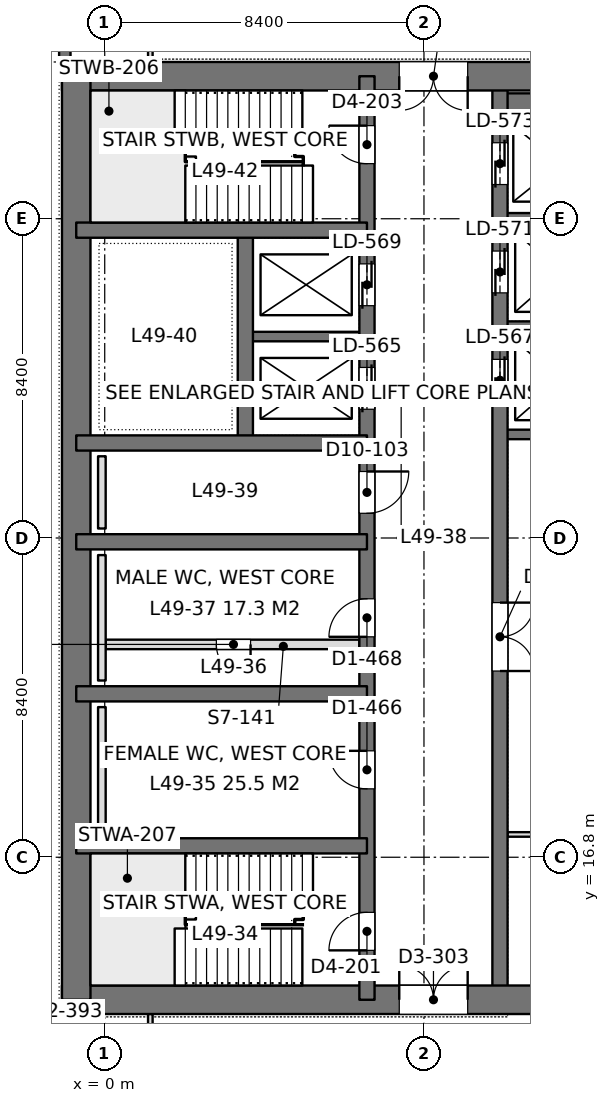
"""IFC4 building model, lengths in metres.
Left out: names, types, materials, properties, quantities, classifications, styles, units other than length and angle.
Written with IfcOpenShell. Run it as: python <this file> out.ifc"""

import sys

from ifc_helpers import new_model, si_unit, direction, frame, frame_2d, origin, place, context, subcontext, project, spatial, rectangle, extrude, element, fill, save


model = new_model("IFC4")
c1 = context("Model", 3, precision=1e-05, world=origin(), true_north=direction((0.0, 1.0)))
c2 = subcontext(c1, "Body", "Model", "MODEL_VIEW")
j1 = project(units=[si_unit("LENGTHUNIT", "METRE"), si_unit("PLANEANGLEUNIT", "RADIAN")], contexts=[c1])
p1 = place(None, origin())
s1 = spatial("IfcSite", under=j1, at=p1, CompositionType="ELEMENT")
p2 = place(p1, origin())
s2 = spatial("IfcBuilding", under=s1, at=p2, CompositionType="ELEMENT")
p3 = place(p2, frame((0.0, 0.0, 215.4)))
s3 = spatial("IfcBuildingStorey", under=s2, at=p3, CompositionType="ELEMENT", Elevation=215.4)
p4 = place(p3, frame((-1.125, 13.05, 0.0), z_axis=(0.0, 0.0, 1.0), x_axis=(1.0, 0.0, 0.0)))
e1 = element("IfcWall", 1, at=p4, inside=s3, PredefinedType="SHEAR", context=c2, shape_type="SweptSolid", body=[
    extrude(rectangle(XDim=17.85, YDim=0.75, at=frame_2d((8.925, 0.0))), origin(), (0.0, 0.0, 1.0), 4.2),
])
p5 = place(p4, frame((8.875, 0.0, 0.0)))
e2 = element("IfcOpeningElement", 2, at=p5, cuts=e1, PredefinedType="OPENING", context=c2, shape_type="SweptSolid", body=[
    extrude(rectangle(XDim=1.8, YDim=2.4, at=frame_2d((0.9, 1.2))), frame((0.0, 0.385, 0.0), z_axis=(0.0, -1.0, 0.0), x_axis=(1.0, 0.0, 0.0)), (0.0, 0.0, 1.0), 0.77),
])
p6 = place(p3, frame((-1.125, 37.35, 0.0), z_axis=(0.0, 0.0, 1.0), x_axis=(1.0, 0.0, 0.0)))
e3 = element("IfcWall", 3, at=p6, inside=s3, PredefinedType="SHEAR", context=c2, shape_type="SweptSolid", body=[
    extrude(rectangle(XDim=17.85, YDim=0.75, at=frame_2d((8.925, 0.0))), origin(), (0.0, 0.0, 1.0), 4.2),
])
p7 = place(p6, frame((8.875, 0.0, 0.0)))
e4 = element("IfcOpeningElement", 4, at=p7, cuts=e3, PredefinedType="OPENING", context=c2, shape_type="SweptSolid", body=[
    extrude(rectangle(XDim=1.8, YDim=2.4, at=frame_2d((0.9, 1.2))), frame((0.0, 0.385, 0.0), z_axis=(0.0, -1.0, 0.0), x_axis=(1.0, 0.0, 0.0)), (0.0, 0.0, 1.0), 0.77),
])
p8 = place(p3, frame((-0.75, 13.05, 0.0), z_axis=(0.0, 0.0, 1.0), x_axis=(0.0, 1.0, 0.0)))
e5 = element("IfcWall", 5, at=p8, inside=s3, PredefinedType="SHEAR", context=c2, shape_type="SweptSolid", body=[
    extrude(rectangle(XDim=24.3, YDim=0.75, at=frame_2d((12.15, 0.0))), origin(), (0.0, 0.0, 1.0), 4.2),
])
p9 = place(p3, frame((6.9, 13.05, 0.0), z_axis=(0.0, 0.0, 1.0), x_axis=(0.0, 1.0, 0.0)))
e6 = element("IfcWall", 6, at=p9, inside=s3, PredefinedType="SHEAR", context=c2, shape_type="SweptSolid", body=[
    extrude(rectangle(XDim=24.3, YDim=0.4, at=frame_2d((12.15, 0.0))), origin(), (0.0, 0.0, 1.0), 4.2),
])
p10 = place(p9, frame((1.3, 0.0, 0.0)))
e7 = element("IfcOpeningElement", 7, at=p10, cuts=e6, PredefinedType="OPENING", context=c2, shape_type="SweptSolid", body=[
    extrude(rectangle(XDim=1.0, YDim=2.2, at=frame_2d((0.5, 1.1))), frame((0.0, 0.21, 0.0), z_axis=(0.0, -1.0, 0.0), x_axis=(1.0, 0.0, 0.0)), (0.0, 0.0, 1.0), 0.42),
])
p11 = place(p9, frame((22.0, 0.0, 0.0)))
e8 = element("IfcOpeningElement", 8, at=p11, cuts=e6, PredefinedType="OPENING", context=c2, shape_type="SweptSolid", body=[
    extrude(rectangle(XDim=1.0, YDim=2.2, at=frame_2d((0.5, 1.1))), frame((0.0, 0.21, 0.0), z_axis=(0.0, -1.0, 0.0), x_axis=(1.0, 0.0, 0.0)), (0.0, 0.0, 1.0), 0.42),
])
p12 = place(p9, frame((5.55, 0.0, 0.0)))
e9 = element("IfcOpeningElement", 9, at=p12, cuts=e6, PredefinedType="OPENING", context=c2, shape_type="SweptSolid", body=[
    extrude(rectangle(XDim=1.0, YDim=2.2, at=frame_2d((0.5, 1.1))), frame((0.0, 0.21, 0.0), z_axis=(0.0, -1.0, 0.0), x_axis=(1.0, 0.0, 0.0)), (0.0, 0.0, 1.0), 0.42),
])
p13 = place(p9, frame((9.55, 0.0, 0.0)))
e10 = element("IfcOpeningElement", 10, at=p13, cuts=e6, PredefinedType="OPENING", context=c2, shape_type="SweptSolid", body=[
    extrude(rectangle(XDim=1.0, YDim=2.2, at=frame_2d((0.5, 1.1))), frame((0.0, 0.21, 0.0), z_axis=(0.0, -1.0, 0.0), x_axis=(1.0, 0.0, 0.0)), (0.0, 0.0, 1.0), 0.42),
])
p14 = place(p9, frame((12.8, 0.0, 0.0)))
e11 = element("IfcOpeningElement", 11, at=p14, cuts=e6, PredefinedType="OPENING", context=c2, shape_type="SweptSolid", body=[
    extrude(rectangle(XDim=1.1, YDim=2.2, at=frame_2d((0.55, 1.1))), frame((0.0, 0.21, 0.0), z_axis=(0.0, -1.0, 0.0), x_axis=(1.0, 0.0, 0.0)), (0.0, 0.0, 1.0), 0.42),
])
p15 = place(p9, frame((15.538, 0.0, 0.0)))
e12 = element("IfcOpeningElement", 12, at=p15, cuts=e6, PredefinedType="OPENING", context=c2, shape_type="SweptSolid", body=[
    extrude(rectangle(XDim=1.1, YDim=2.2, at=frame_2d((0.55, 1.1))), frame((0.0, 0.21, 0.0), z_axis=(0.0, -1.0, 0.0), x_axis=(1.0, 0.0, 0.0)), (0.0, 0.0, 1.0), 0.42),
])
p16 = place(p9, frame((18.262, 0.0, 0.0)))
e13 = element("IfcOpeningElement", 13, at=p16, cuts=e6, PredefinedType="OPENING", context=c2, shape_type="SweptSolid", body=[
    extrude(rectangle(XDim=1.1, YDim=2.2, at=frame_2d((0.55, 1.1))), frame((0.0, 0.21, 0.0), z_axis=(0.0, -1.0, 0.0), x_axis=(1.0, 0.0, 0.0)), (0.0, 0.0, 1.0), 0.42),
])
p17 = place(p3, frame((10.4, 13.05, 0.0), z_axis=(0.0, 0.0, 1.0), x_axis=(0.0, 1.0, 0.0)))
e14 = element("IfcWall", 14, at=p17, inside=s3, PredefinedType="SHEAR", context=c2, shape_type="SweptSolid", body=[
    extrude(rectangle(XDim=24.3, YDim=0.4, at=frame_2d((12.15, 0.0))), origin(), (0.0, 0.0, 1.0), 4.2),
])
p18 = place(p17, frame((15.75, 0.0, 0.0)))
e15 = element("IfcOpeningElement", 15, at=p18, cuts=e14, PredefinedType="OPENING", context=c2, shape_type="SweptSolid", body=[
    extrude(rectangle(XDim=1.1, YDim=2.2, at=frame_2d((0.55, 1.1))), frame((0.0, 0.21, 0.0), z_axis=(0.0, -1.0, 0.0), x_axis=(1.0, 0.0, 0.0)), (0.0, 0.0, 1.0), 0.42),
])
p19 = place(p17, frame((18.6, 0.0, 0.0)))
e16 = element("IfcOpeningElement", 16, at=p19, cuts=e14, PredefinedType="OPENING", context=c2, shape_type="SweptSolid", body=[
    extrude(rectangle(XDim=1.1, YDim=2.2, at=frame_2d((0.55, 1.1))), frame((0.0, 0.21, 0.0), z_axis=(0.0, -1.0, 0.0), x_axis=(1.0, 0.0, 0.0)), (0.0, 0.0, 1.0), 0.42),
])
p20 = place(p17, frame((21.45, 0.0, 0.0)))
e17 = element("IfcOpeningElement", 17, at=p20, cuts=e14, PredefinedType="OPENING", context=c2, shape_type="SweptSolid", body=[
    extrude(rectangle(XDim=1.1, YDim=2.2, at=frame_2d((0.55, 1.1))), frame((0.0, 0.21, 0.0), z_axis=(0.0, -1.0, 0.0), x_axis=(1.0, 0.0, 0.0)), (0.0, 0.0, 1.0), 0.42),
])
p21 = place(p17, frame((8.65, 0.0, 0.0)))
e18 = element("IfcOpeningElement", 18, at=p21, cuts=e14, PredefinedType="OPENING", context=c2, shape_type="SweptSolid", body=[
    extrude(rectangle(XDim=1.8, YDim=2.4, at=frame_2d((0.9, 1.2))), frame((0.0, 0.21, 0.0), z_axis=(0.0, -1.0, 0.0), x_axis=(1.0, 0.0, 0.0)), (0.0, 0.0, 1.0), 0.42),
])
for number, where, z_axis, x_axis in (
    (19, (-0.75, 17.1, 0.0), (0.0, 0.0, 1.0), (1.0, 0.0, 0.0)),
    (20, (-0.75, 21.1, 0.0), (0.0, 0.0, 1.0), (1.0, 0.0, 0.0)),
    (21, (-0.75, 25.1, 0.0), (0.0, 0.0, 1.0), (1.0, 0.0, 0.0)),
    (22, (-0.75, 27.7, 0.0), (0.0, 0.0, 1.0), (1.0, 0.0, 0.0)),
    (23, (-0.75, 33.3, 0.0), (0.0, 0.0, 1.0), (1.0, 0.0, 0.0)),
):
    element("IfcWall", number, at=place(p3, frame(where, z_axis=z_axis, x_axis=x_axis)), inside=s3, PredefinedType="SHEAR", context=c2, shape_type="SweptSolid", body=[
        extrude(rectangle(XDim=7.65, YDim=0.4, at=frame_2d((3.825, 0.0))), origin(), (0.0, 0.0, 1.0), 4.2),
    ])
p22 = place(p3, frame((3.7, 27.7, 0.0), z_axis=(0.0, 0.0, 1.0), x_axis=(0.0, 1.0, 0.0)))
e24 = element("IfcWall", 24, at=p22, inside=s3, PredefinedType="SHEAR", context=c2, shape_type="SweptSolid", body=[
    extrude(rectangle(XDim=5.6, YDim=0.4, at=frame_2d((2.8, 0.0))), origin(), (0.0, 0.0, 1.0), 4.2),
])
p23 = place(p3, frame((3.7, 30.5, 0.0), z_axis=(0.0, 0.0, 1.0), x_axis=(1.0, 0.0, 0.0)))
e25 = element("IfcWall", 25, at=p23, inside=s3, PredefinedType="SHEAR", context=c2, shape_type="SweptSolid", body=[
    extrude(rectangle(XDim=3.2, YDim=0.25, at=frame_2d((1.6, 0.0))), origin(), (0.0, 0.0, 1.0), 4.2),
])
p24 = place(p3, frame((10.4, 27.925, 0.0), z_axis=(0.0, 0.0, 1.0), x_axis=(1.0, 0.0, 0.0)))
e26 = element("IfcWall", 26, at=p24, inside=s3, PredefinedType="SHEAR", context=c2, shape_type="SweptSolid", body=[
    extrude(rectangle(XDim=5.95, YDim=0.25, at=frame_2d((2.975, 0.0))), origin(), (0.0, 0.0, 1.0), 4.2),
])
for number, where, z_axis, x_axis in (
    (27, (10.4, 30.775, 0.0), (0.0, 0.0, 1.0), (1.0, 0.0, 0.0)),
    (28, (10.4, 33.625, 0.0), (0.0, 0.0, 1.0), (1.0, 0.0, 0.0)),
):
    element("IfcWall", number, at=place(p3, frame(where, z_axis=z_axis, x_axis=x_axis)), inside=s3, PredefinedType="SHEAR", context=c2, shape_type="SweptSolid", body=[
        extrude(rectangle(XDim=3.2, YDim=0.25, at=frame_2d((1.6, 0.0))), origin(), (0.0, 0.0, 1.0), 4.2),
    ])
p25 = place(p3, frame((10.4, 36.625, 0.0), z_axis=(0.0, 0.0, 1.0), x_axis=(1.0, 0.0, 0.0)))
e29 = element("IfcWall", 29, at=p25, inside=s3, PredefinedType="SHEAR", context=c2, shape_type="SweptSolid", body=[
    extrude(rectangle(XDim=3.2, YDim=0.55, at=frame_2d((1.6, 0.0))), origin(), (0.0, 0.0, 1.0), 4.2),
])
p26 = place(p3, frame((-1.05, 8.4, 0.0), z_axis=(0.0, 0.0, 1.0), x_axis=(0.0, 1.0, 0.0)))
e30 = element("IfcWall", 30, at=p26, inside=s3, PredefinedType="SOLIDWALL", context=c2, shape_type="SweptSolid", body=[
    extrude(rectangle(XDim=4.275, YDim=0.3, at=frame_2d((2.138, 0.0))), origin(), (0.0, 0.0, 1.0), 4.05),
])
p27 = place(p26, frame((0.938, 0.0, 0.9)))
e31 = element("IfcOpeningElement", 31, at=p27, cuts=e30, PredefinedType="OPENING", context=c2, shape_type="SweptSolid", body=[
    extrude(rectangle(XDim=2.4, YDim=1.9, at=frame_2d((1.2, 0.95))), frame((0.0, 0.16, 0.0), z_axis=(0.0, -1.0, 0.0), x_axis=(1.0, 0.0, 0.0)), (0.0, 0.0, 1.0), 0.32),
])
p28 = place(p3, frame((-1.05, 37.725, 0.0), z_axis=(0.0, 0.0, 1.0), x_axis=(0.0, 1.0, 0.0)))
e32 = element("IfcWall", 32, at=p28, inside=s3, PredefinedType="SOLIDWALL", context=c2, shape_type="SweptSolid", body=[
    extrude(rectangle(XDim=4.275, YDim=0.3, at=frame_2d((2.137, 0.0))), origin(), (0.0, 0.0, 1.0), 4.05),
])
p29 = place(p28, frame((0.938, 0.0, 0.9)))
e33 = element("IfcOpeningElement", 33, at=p29, cuts=e32, PredefinedType="OPENING", context=c2, shape_type="SweptSolid", body=[
    extrude(rectangle(XDim=2.4, YDim=1.9, at=frame_2d((1.2, 0.95))), frame((0.0, 0.16, 0.0), z_axis=(0.0, -1.0, 0.0), x_axis=(1.0, 0.0, 0.0)), (0.0, 0.0, 1.0), 0.32),
])
p30 = place(p3, frame((10.598, 17.4, 0.0), z_axis=(0.0, 0.0, 1.0), x_axis=(1.0, 0.0, 0.0)))
e34 = element("IfcWall", 34, at=p30, inside=s3, PredefinedType="PARTITIONING", context=c2, shape_type="SweptSolid", body=[
    extrude(rectangle(XDim=5.904, YDim=0.12, at=frame_2d((2.952, 0.0))), origin(), (0.0, 0.0, 1.0), 3.55),
])
p31 = place(p3, frame((1.2, 10.7, 0.0), z_axis=(0.0, 0.0, 1.0), x_axis=(0.0, 1.0, 0.0)))
e35 = element("IfcWall", 35, at=p31, inside=s3, PredefinedType="PARTITIONING", context=c2, shape_type="SweptSolid", body=[
    extrude(rectangle(XDim=1.976, YDim=0.12, at=frame_2d((0.988, 0.0))), origin(), (0.0, 0.0, 1.0), 4.05),
])
p32 = place(p3, frame((1.2, 37.724, 0.0), z_axis=(0.0, 0.0, 1.0), x_axis=(0.0, 1.0, 0.0)))
e36 = element("IfcWall", 36, at=p32, inside=s3, PredefinedType="PARTITIONING", context=c2, shape_type="SweptSolid", body=[
    extrude(rectangle(XDim=1.976, YDim=0.12, at=frame_2d((0.988, 0.0))), origin(), (0.0, 0.0, 1.0), 4.05),
])
p33 = place(p3, frame((0.025, 22.4, 0.0), z_axis=(0.0, 0.0, 1.0), x_axis=(1.0, 0.0, 0.0)))
e37 = element("IfcWall", 37, at=p33, inside=s3, PredefinedType="PARTITIONING", context=c2, shape_type="SweptSolid", body=[
    extrude(rectangle(XDim=6.675, YDim=0.25, at=frame_2d((3.337, 0.0))), origin(), (0.0, 0.0, 1.0), 4.0),
])
p34 = place(p33, frame((2.913, 0.0, 0.0)))
e38 = element("IfcOpeningElement", 38, at=p34, cuts=e37, PredefinedType="OPENING", context=c2, shape_type="SweptSolid", body=[
    extrude(rectangle(XDim=0.9, YDim=2.2, at=frame_2d((0.45, 1.1))), frame((0.0, 0.135, 0.0), z_axis=(0.0, -1.0, 0.0), x_axis=(1.0, 0.0, 0.0)), (0.0, 0.0, 1.0), 0.27),
])
for number, where, z_axis, x_axis in (
    (39, (-0.075, 17.45, 0.0), (0.0, 0.0, 1.0), (0.0, 1.0, 0.0)),
    (40, (-0.075, 21.45, 0.0), (0.0, 0.0, 1.0), (0.0, 1.0, 0.0)),
):
    element("IfcWall", number, at=place(p3, frame(where, z_axis=z_axis, x_axis=x_axis)), inside=s3, PredefinedType="PLUMBINGWALL", context=c2, shape_type="SweptSolid", body=[
        extrude(rectangle(XDim=3.3, YDim=0.2, at=frame_2d((1.65, 0.0))), origin(), (0.0, 0.0, 1.0), 1.2),
    ])
p35 = place(p3, frame((-0.075, 25.45, 0.0), z_axis=(0.0, 0.0, 1.0), x_axis=(0.0, 1.0, 0.0)))
e41 = element("IfcWall", 41, at=p35, inside=s3, PredefinedType="PLUMBINGWALL", context=c2, shape_type="SweptSolid", body=[
    extrude(rectangle(XDim=1.9, YDim=0.2, at=frame_2d((0.95, 0.0))), origin(), (0.0, 0.0, 1.0), 1.2),
])
p36 = place(p5, origin())
e42 = element("IfcDoor", 42, at=p36, inside=s3, OperationType="DOUBLE_DOOR_SINGLE_SWING", PredefinedType="DOOR", context=c2, shape_type="SweptSolid", body=[
    extrude(rectangle(XDim=1.8, YDim=2.4, at=frame_2d((0.9, 1.2))), frame((0.0, 0.025, 0.0), z_axis=(0.0, -1.0, 0.0), x_axis=(1.0, 0.0, 0.0)), (0.0, 0.0, 1.0), 0.05),
])
fill(e2, e42)
p37 = place(p7, frame((1.8, 0.0, 0.0), z_axis=(0.0, 0.0, 1.0), x_axis=(-1.0, 0.0, 0.0)))
e43 = element("IfcDoor", 43, at=p37, inside=s3, OperationType="DOUBLE_DOOR_SINGLE_SWING", PredefinedType="DOOR", context=c2, shape_type="SweptSolid", body=[
    extrude(rectangle(XDim=1.8, YDim=2.4, at=frame_2d((0.9, 1.2))), frame((0.0, 0.025, 0.0), z_axis=(0.0, -1.0, 0.0), x_axis=(1.0, 0.0, 0.0)), (0.0, 0.0, 1.0), 0.05),
])
fill(e4, e43)
p38 = place(p10, origin())
e44 = element("IfcDoor", 44, at=p38, inside=s3, OperationType="SINGLE_SWING_LEFT", PredefinedType="DOOR", context=c2, shape_type="SweptSolid", body=[
    extrude(rectangle(XDim=1.0, YDim=2.2, at=frame_2d((0.5, 1.1))), frame((0.0, 0.025, 0.0), z_axis=(0.0, -1.0, 0.0), x_axis=(1.0, 0.0, 0.0)), (0.0, 0.0, 1.0), 0.05),
])
fill(e7, e44)
p39 = place(p11, origin())
e45 = element("IfcDoor", 45, at=p39, inside=s3, OperationType="SINGLE_SWING_RIGHT", PredefinedType="DOOR", context=c2, shape_type="SweptSolid", body=[
    extrude(rectangle(XDim=1.0, YDim=2.2, at=frame_2d((0.5, 1.1))), frame((0.0, 0.025, 0.0), z_axis=(0.0, -1.0, 0.0), x_axis=(1.0, 0.0, 0.0)), (0.0, 0.0, 1.0), 0.05),
])
fill(e8, e45)
p40 = place(p12, origin())
e46 = element("IfcDoor", 46, at=p40, inside=s3, OperationType="SINGLE_SWING_RIGHT", PredefinedType="DOOR", context=c2, shape_type="SweptSolid", body=[
    extrude(rectangle(XDim=1.0, YDim=2.2, at=frame_2d((0.5, 1.1))), frame((0.0, 0.025, 0.0), z_axis=(0.0, -1.0, 0.0), x_axis=(1.0, 0.0, 0.0)), (0.0, 0.0, 1.0), 0.05),
])
fill(e9, e46)
p41 = place(p13, origin())
e47 = element("IfcDoor", 47, at=p41, inside=s3, OperationType="SINGLE_SWING_LEFT", PredefinedType="DOOR", context=c2, shape_type="SweptSolid", body=[
    extrude(rectangle(XDim=1.0, YDim=2.2, at=frame_2d((0.5, 1.1))), frame((0.0, 0.025, 0.0), z_axis=(0.0, -1.0, 0.0), x_axis=(1.0, 0.0, 0.0)), (0.0, 0.0, 1.0), 0.05),
])
fill(e10, e47)
p42 = place(p14, frame((1.1, 0.0, 0.0), z_axis=(0.0, 0.0, 1.0), x_axis=(-1.0, 0.0, 0.0)))
e48 = element("IfcDoor", 48, at=p42, inside=s3, OperationType="SINGLE_SWING_LEFT", PredefinedType="DOOR", context=c2, shape_type="SweptSolid", body=[
    extrude(rectangle(XDim=1.1, YDim=2.2, at=frame_2d((0.55, 1.1))), frame((0.0, 0.025, 0.0), z_axis=(0.0, -1.0, 0.0), x_axis=(1.0, 0.0, 0.0)), (0.0, 0.0, 1.0), 0.05),
])
fill(e11, e48)
p43 = place(p18, origin())
e49 = element("IfcDoor", 49, at=p43, inside=s3, OperationType="DOUBLE_DOOR_SLIDING", PredefinedType="DOOR", context=c2, shape_type="SweptSolid", body=[
    extrude(rectangle(XDim=1.1, YDim=2.2, at=frame_2d((0.55, 1.1))), frame((0.0, 0.025, 0.0), z_axis=(0.0, -1.0, 0.0), x_axis=(1.0, 0.0, 0.0)), (0.0, 0.0, 1.0), 0.05),
])
fill(e15, e49)
p44 = place(p19, origin())
e50 = element("IfcDoor", 50, at=p44, inside=s3, OperationType="DOUBLE_DOOR_SLIDING", PredefinedType="DOOR", context=c2, shape_type="SweptSolid", body=[
    extrude(rectangle(XDim=1.1, YDim=2.2, at=frame_2d((0.55, 1.1))), frame((0.0, 0.025, 0.0), z_axis=(0.0, -1.0, 0.0), x_axis=(1.0, 0.0, 0.0)), (0.0, 0.0, 1.0), 0.05),
])
fill(e16, e50)
p45 = place(p20, origin())
e51 = element("IfcDoor", 51, at=p45, inside=s3, OperationType="DOUBLE_DOOR_SLIDING", PredefinedType="DOOR", context=c2, shape_type="SweptSolid", body=[
    extrude(rectangle(XDim=1.1, YDim=2.2, at=frame_2d((0.55, 1.1))), frame((0.0, 0.025, 0.0), z_axis=(0.0, -1.0, 0.0), x_axis=(1.0, 0.0, 0.0)), (0.0, 0.0, 1.0), 0.05),
])
fill(e17, e51)
p46 = place(p15, origin())
e52 = element("IfcDoor", 52, at=p46, inside=s3, OperationType="DOUBLE_DOOR_SLIDING", PredefinedType="DOOR", context=c2, shape_type="SweptSolid", body=[
    extrude(rectangle(XDim=1.1, YDim=2.2, at=frame_2d((0.55, 1.1))), frame((0.0, 0.025, 0.0), z_axis=(0.0, -1.0, 0.0), x_axis=(1.0, 0.0, 0.0)), (0.0, 0.0, 1.0), 0.05),
])
fill(e12, e52)
p47 = place(p16, origin())
e53 = element("IfcDoor", 53, at=p47, inside=s3, OperationType="DOUBLE_DOOR_SLIDING", PredefinedType="DOOR", context=c2, shape_type="SweptSolid", body=[
    extrude(rectangle(XDim=1.1, YDim=2.2, at=frame_2d((0.55, 1.1))), frame((0.0, 0.025, 0.0), z_axis=(0.0, -1.0, 0.0), x_axis=(1.0, 0.0, 0.0)), (0.0, 0.0, 1.0), 0.05),
])
fill(e13, e53)
p48 = place(p21, frame((1.8, 0.0, 0.0), z_axis=(0.0, 0.0, 1.0), x_axis=(-1.0, 0.0, 0.0)))
e54 = element("IfcDoor", 54, at=p48, inside=s3, OperationType="DOUBLE_DOOR_SINGLE_SWING", PredefinedType="DOOR", context=c2, shape_type="SweptSolid", body=[
    extrude(rectangle(XDim=1.8, YDim=2.4, at=frame_2d((0.9, 1.2))), frame((0.0, 0.025, 0.0), z_axis=(0.0, -1.0, 0.0), x_axis=(1.0, 0.0, 0.0)), (0.0, 0.0, 1.0), 0.05),
])
fill(e18, e54)
p49 = place(p34, frame((0.9, 0.0, 0.0), z_axis=(0.0, 0.0, 1.0), x_axis=(-1.0, 0.0, 0.0)))
e55 = element("IfcDoor", 55, at=p49, inside=s3, OperationType="SINGLE_SWING_LEFT", PredefinedType="DOOR", context=c2, shape_type="SweptSolid", body=[
    extrude(rectangle(XDim=0.9, YDim=2.2, at=frame_2d((0.45, 1.1))), frame((0.0, 0.025, 0.0), z_axis=(0.0, -1.0, 0.0), x_axis=(1.0, 0.0, 0.0)), (0.0, 0.0, 1.0), 0.05),
])
fill(e38, e55)
save(model, sys.argv[1])
